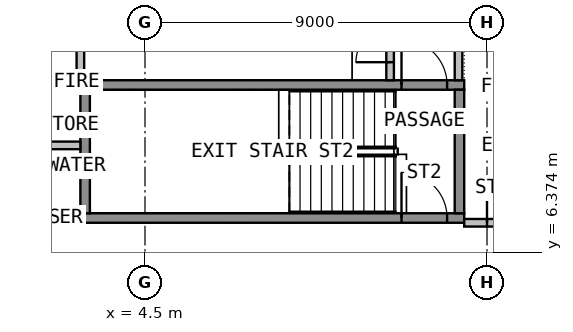
"""IFC4 building model, lengths in metres.
Left out: names, types, materials, properties, quantities, classifications, styles, units other than length and angle.
Written with IfcOpenShell. Run it as: python <this file> out.ifc"""

import sys

from ifc_helpers import new_model, si_unit, direction, frame, frame_2d, origin, place, context, subcontext, project, spatial, rectangle, extrude, element, fill, save


model = new_model("IFC4")
c1 = context("Model", 3, precision=1e-05, world=origin(), true_north=direction((0.0, 1.0)))
c2 = subcontext(c1, "Body", "Model", "MODEL_VIEW")
j1 = project(units=[si_unit("LENGTHUNIT", "METRE"), si_unit("PLANEANGLEUNIT", "RADIAN")], contexts=[c1])
p1 = place(None, origin())
s1 = spatial("IfcSite", under=j1, at=p1, CompositionType="ELEMENT")
p2 = place(p1, origin())
s2 = spatial("IfcBuilding", under=s1, at=p2, CompositionType="ELEMENT")
p3 = place(p2, frame((0.0, 0.0, 144.3)))
s3 = spatial("IfcBuildingStorey", under=s2, at=p3, CompositionType="ELEMENT", Elevation=144.3)
p4 = place(p3, frame((2.8, 7.275, 0.0), z_axis=(0.0, 0.0, 1.0), x_axis=(1.0, 0.0, 0.0)))
e1 = element("IfcWall", 1, at=p4, inside=s3, PredefinedType="SHEAR", context=c2, shape_type="SweptSolid", body=[
    extrude(rectangle(XDim=10.1, YDim=0.25, at=frame_2d((5.05, 0.0))), origin(), (0.0, 0.0, 1.0), 3.575),
])
p5 = place(p4, frame((8.45, 0.0, 0.0)))
e2 = element("IfcOpeningElement", 2, at=p5, cuts=e1, PredefinedType="OPENING", context=c2, shape_type="SweptSolid", body=[
    extrude(rectangle(XDim=1.2, YDim=2.1, at=frame_2d((0.6, 1.05))), frame((0.0, 0.135, 0.0), z_axis=(0.0, -1.0, 0.0), x_axis=(1.0, 0.0, 0.0)), (0.0, 0.0, 1.0), 0.27),
])
p6 = place(p3, frame((2.8, 10.775, 0.0), z_axis=(0.0, 0.0, 1.0), x_axis=(1.0, 0.0, 0.0)))
e3 = element("IfcWall", 3, at=p6, inside=s3, PredefinedType="SHEAR", context=c2, shape_type="SweptSolid", body=[
    extrude(rectangle(XDim=10.1, YDim=0.25, at=frame_2d((5.05, 0.0))), origin(), (0.0, 0.0, 1.0), 3.575),
])
p7 = place(p6, frame((8.45, 0.0, 0.0)))
e4 = element("IfcOpeningElement", 4, at=p7, cuts=e3, PredefinedType="OPENING", context=c2, shape_type="SweptSolid", body=[
    extrude(rectangle(XDim=1.2, YDim=2.1, at=frame_2d((0.6, 1.05))), frame((0.0, 0.135, 0.0), z_axis=(0.0, -1.0, 0.0), x_axis=(1.0, 0.0, 0.0)), (0.0, 0.0, 1.0), 0.27),
])
for number, where, z_axis, x_axis in (
    (5, (2.925, 7.4, 0.0), (0.0, 0.0, 1.0), (0.0, 1.0, 0.0)),
    (6, (12.775, 7.4, 0.0), (0.0, 0.0, 1.0), (0.0, 1.0, 0.0)),
):
    element("IfcWall", number, at=place(p3, frame(where, z_axis=z_axis, x_axis=x_axis)), inside=s3, PredefinedType="SHEAR", context=c2, shape_type="SweptSolid", body=[
        extrude(rectangle(XDim=3.25, YDim=0.25, at=frame_2d((1.625, 0.0))), origin(), (0.0, 0.0, 1.0), 3.575),
    ])
for number, where, z_axis, x_axis in (
    (7, (1.4, 7.25, 0.0), (0.0, 0.0, 1.0), (1.0, 0.0, 0.0)),
    (8, (1.4, 9.186, 0.0), (0.0, 0.0, 1.0), (1.0, 0.0, 0.0)),
    (9, (1.4, 10.968, 0.0), (0.0, 0.0, 1.0), (1.0, 0.0, 0.0)),
):
    element("IfcWall", number, at=place(p3, frame(where, z_axis=z_axis, x_axis=x_axis)), inside=s3, PredefinedType="PARTITIONING", context=c2, shape_type="SweptSolid", body=[
        extrude(rectangle(XDim=1.4, YDim=0.2, at=frame_2d((0.7, 0.0))), origin(), (0.0, 0.0, 1.0), 3.575),
    ])
p8 = place(p3, frame((12.75, 10.9, 0.0), z_axis=(0.0, 0.0, 1.0), x_axis=(0.0, 1.0, 0.0)))
e10 = element("IfcWall", 10, at=p8, inside=s3, PredefinedType="PARTITIONING", context=c2, shape_type="SweptSolid", body=[
    extrude(rectangle(XDim=1.85, YDim=0.2, at=frame_2d((0.925, 0.0))), origin(), (0.0, 0.0, 1.0), 3.575),
])
p9 = place(p3, frame((10.95, 10.9, 0.0), z_axis=(0.0, 0.0, 1.0), x_axis=(0.0, 1.0, 0.0)))
e11 = element("IfcWall", 11, at=p9, inside=s3, PredefinedType="PARTITIONING", context=c2, shape_type="SweptSolid", body=[
    extrude(rectangle(XDim=1.85, YDim=0.2, at=frame_2d((0.925, 0.0))), origin(), (0.0, 0.0, 1.0), 3.575),
])
p10 = place(p9, frame((0.475, 0.0, 0.0)))
e12 = element("IfcOpeningElement", 12, at=p10, cuts=e11, PredefinedType="OPENING", context=c2, shape_type="SweptSolid", body=[
    extrude(rectangle(XDim=0.9, YDim=2.1, at=frame_2d((0.45, 1.05))), frame((0.0, 0.11, 0.0), z_axis=(0.0, -1.0, 0.0), x_axis=(1.0, 0.0, 0.0)), (0.0, 0.0, 1.0), 0.22),
])
p11 = place(p3, frame((12.9, 7.15, 0.0), z_axis=(0.0, 0.0, 1.0), x_axis=(1.0, 0.0, 0.0)))
e13 = element("IfcWall", 13, at=p11, inside=s3, PredefinedType="PARTITIONING", context=c2, shape_type="SweptSolid", body=[
    extrude(rectangle(XDim=2.1, YDim=0.2, at=frame_2d((1.05, 0.0))), origin(), (0.0, 0.0, 1.0), 3.575),
])
p12 = place(p11, frame((0.6, 0.0, 0.0)))
e14 = element("IfcOpeningElement", 14, at=p12, cuts=e13, PredefinedType="OPENING", context=c2, shape_type="SweptSolid", body=[
    extrude(rectangle(XDim=0.9, YDim=2.1, at=frame_2d((0.45, 1.05))), frame((0.0, 0.11, 0.0), z_axis=(0.0, -1.0, 0.0), x_axis=(1.0, 0.0, 0.0)), (0.0, 0.0, 1.0), 0.22),
])
p13 = place(p3, frame((2.8, 12.749, 0.0), z_axis=(0.0, 0.0, 1.0), x_axis=(0.0, -1.0, 0.0)))
e15 = element("IfcWall", 15, at=p13, inside=s3, PredefinedType="PARTITIONING", context=c2, shape_type="SweptSolid", body=[
    extrude(rectangle(XDim=1.68, YDim=0.2, at=frame_2d((0.84, 0.0))), origin(), (0.0, 0.0, 1.0), 3.575),
])
p14 = place(p5, origin())
e16 = element("IfcDoor", 16, at=p14, inside=s3, OperationType="SINGLE_SWING_LEFT", PredefinedType="DOOR", context=c2, shape_type="SweptSolid", body=[
    extrude(rectangle(XDim=1.2, YDim=2.1, at=frame_2d((0.6, 1.05))), frame((0.0, 0.025, 0.0), z_axis=(0.0, -1.0, 0.0), x_axis=(1.0, 0.0, 0.0)), (0.0, 0.0, 1.0), 0.05),
])
fill(e2, e16)
p15 = place(p7, origin())
e17 = element("IfcDoor", 17, at=p15, inside=s3, OperationType="SINGLE_SWING_RIGHT", PredefinedType="DOOR", context=c2, shape_type="SweptSolid", body=[
    extrude(rectangle(XDim=1.2, YDim=2.1, at=frame_2d((0.6, 1.05))), frame((0.0, 0.025, 0.0), z_axis=(0.0, -1.0, 0.0), x_axis=(1.0, 0.0, 0.0)), (0.0, 0.0, 1.0), 0.05),
])
fill(e4, e17)
p16 = place(p10, origin())
e18 = element("IfcDoor", 18, at=p16, inside=s3, OperationType="SINGLE_SWING_LEFT", PredefinedType="DOOR", context=c2, shape_type="SweptSolid", body=[
    extrude(rectangle(XDim=0.9, YDim=2.1, at=frame_2d((0.45, 1.05))), frame((0.0, 0.025, 0.0), z_axis=(0.0, -1.0, 0.0), x_axis=(1.0, 0.0, 0.0)), (0.0, 0.0, 1.0), 0.05),
])
fill(e12, e18)
p17 = place(p12, origin())
e19 = element("IfcDoor", 19, at=p17, inside=s3, OperationType="SINGLE_SWING_LEFT", PredefinedType="DOOR", context=c2, shape_type="SweptSolid", body=[
    extrude(rectangle(XDim=0.9, YDim=2.1, at=frame_2d((0.45, 1.05))), frame((0.0, 0.025, 0.0), z_axis=(0.0, -1.0, 0.0), x_axis=(1.0, 0.0, 0.0)), (0.0, 0.0, 1.0), 0.05),
])
fill(e14, e19)
save(model, sys.argv[1])
